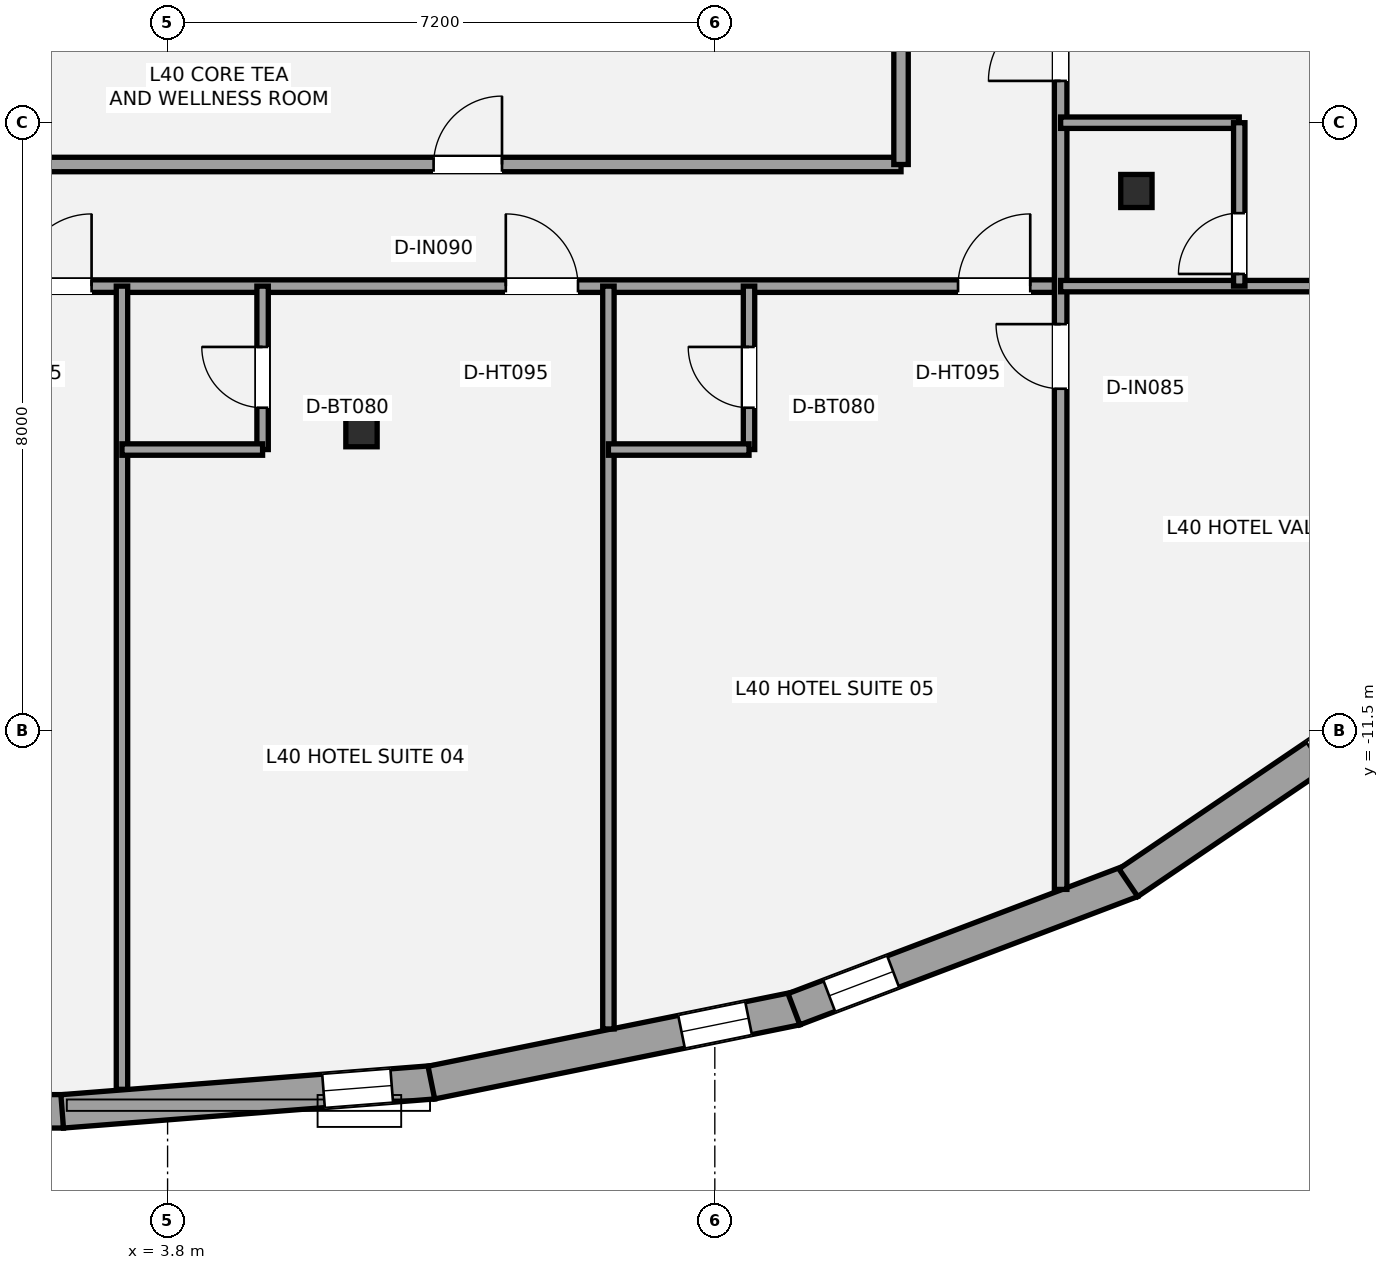
"""IFC4 building model, lengths in metres.
Left out: names, types, materials, properties, quantities, classifications, styles, units other than length and angle.
Written with IfcOpenShell. Run it as: python <this file> out.ifc"""

import sys

from ifc_helpers import new_model, si_unit, direction, frame, frame_2d, origin, origin_2d, place, context, subcontext, project, spatial, rectangle, i_section, extrude, element, fill, save


model = new_model("IFC4")
c1 = context("Model", 3, precision=1e-05, world=origin(), true_north=direction((0.0, 1.0)))
c2 = subcontext(c1, "Body", "Model", "MODEL_VIEW")
j1 = project(units=[si_unit("LENGTHUNIT", "METRE"), si_unit("PLANEANGLEUNIT", "RADIAN")], contexts=[c1])
p1 = place(None, origin())
s1 = spatial("IfcSite", under=j1, at=p1, CompositionType="ELEMENT")
p2 = place(p1, origin())
s2 = spatial("IfcBuilding", under=s1, at=p2, CompositionType="ELEMENT")
p3 = place(p2, frame((0.0, 0.0, 150.2)))
s3 = spatial("IfcBuildingStorey", under=s2, at=p3, CompositionType="ELEMENT", Elevation=150.2)
for number, where, z_axis, x_axis in (
    (1, (6.351, -7.546, 0.0), (0.0, 0.0, 1.0), (1.0, 0.0, 0.0)),
    (2, (16.547, -4.398, 0.0), (0.0, 0.0, 1.0), (1.0, 0.0, 0.0)),
):
    element("IfcColumn", number, at=place(p3, frame(where, z_axis=z_axis, x_axis=x_axis)), inside=s3, PredefinedType="COLUMN", context=c2, shape_type="SweptSolid", body=[
        extrude(i_section(OverallWidth=0.412, OverallDepth=0.435, WebThickness=0.036, FlangeThickness=0.057, at=origin_2d()), origin(), (0.0, 0.0, 1.0), 3.2),
    ])
p4 = place(p3, frame((2.43, -16.507, 0.0), z_axis=(0.0, 0.0, 1.0), x_axis=(-1.0, 0.0, 0.0)))
e3 = element("IfcWall", 3, at=p4, inside=s3, PredefinedType="STANDARD", context=c2, shape_type="SweptSolid", body=[
    extrude(rectangle(XDim=4.861, YDim=0.44, at=frame_2d((2.43, 0.0))), origin(), (0.0, 0.0, 1.0), 2.315),
])
p5 = place(p4, frame((0.596, 0.0, 0.58)))
e4 = element("IfcOpeningElement", 4, at=p5, cuts=e3, PredefinedType="OPENING", context=c2, shape_type="SweptSolid", body=[
    extrude(rectangle(XDim=0.9, YDim=1.35, at=frame_2d((0.45, 0.675))), frame((0.0, 0.23, 0.0), z_axis=(0.0, -1.0, 0.0), x_axis=(1.0, 0.0, 0.0)), (0.0, 0.0, 1.0), 0.46),
])
p6 = place(p3, frame((7.297, -16.125, 0.0), z_axis=(0.0, 0.0, 1.0), x_axis=(-0.996946218403, -0.078091213409, 0.0)))
e5 = element("IfcWall", 5, at=p6, inside=s3, PredefinedType="STANDARD", context=c2, shape_type="SweptSolid", body=[
    extrude(rectangle(XDim=4.899, YDim=0.44, at=frame_2d((2.449, 0.0))), origin(), (0.0, 0.0, 1.0), 2.315),
])
p7 = place(p6, frame((0.55, 0.0, 0.58)))
e6 = element("IfcOpeningElement", 6, at=p7, cuts=e5, PredefinedType="OPENING", context=c2, shape_type="SweptSolid", body=[
    extrude(rectangle(XDim=0.9, YDim=1.35, at=frame_2d((0.45, 0.675))), frame((0.0, 0.23, 0.0), z_axis=(0.0, -1.0, 0.0), x_axis=(1.0, 0.0, 0.0)), (0.0, 0.0, 1.0), 0.46),
])
p8 = place(p3, frame((12.075, -15.153, 0.0), z_axis=(0.0, 0.0, 1.0), x_axis=(-0.980021305588, -0.198892535291, 0.0)))
e7 = element("IfcWall", 7, at=p8, inside=s3, PredefinedType="STANDARD", context=c2, shape_type="SweptSolid", body=[
    extrude(rectangle(XDim=4.903, YDim=0.44, at=frame_2d((2.451, 0.0))), origin(), (0.0, 0.0, 1.0), 2.315),
])
p9 = place(p8, frame((0.644, 0.0, 0.58)))
e8 = element("IfcOpeningElement", 8, at=p9, cuts=e7, PredefinedType="OPENING", context=c2, shape_type="SweptSolid", body=[
    extrude(rectangle(XDim=0.9, YDim=1.35, at=frame_2d((0.45, 0.675))), frame((0.0, 0.23, 0.0), z_axis=(0.0, -1.0, 0.0), x_axis=(1.0, 0.0, 0.0)), (0.0, 0.0, 1.0), 0.46),
])
p10 = place(p3, frame((16.486, -13.475, 0.0), z_axis=(0.0, 0.0, 1.0), x_axis=(-0.93488004884, -0.354963792916, 0.0)))
e9 = element("IfcWall", 9, at=p10, inside=s3, PredefinedType="STANDARD", context=c2, shape_type="SweptSolid", body=[
    extrude(rectangle(XDim=4.755, YDim=0.44, at=frame_2d((2.377, 0.0))), origin(), (0.0, 0.0, 1.0), 2.315),
])
p11 = place(p10, frame((3.358, 0.0, 0.58)))
e10 = element("IfcOpeningElement", 10, at=p11, cuts=e9, PredefinedType="OPENING", context=c2, shape_type="SweptSolid", body=[
    extrude(rectangle(XDim=0.9, YDim=1.35, at=frame_2d((0.45, 0.675))), frame((0.0, 0.23, 0.0), z_axis=(0.0, -1.0, 0.0), x_axis=(1.0, 0.0, 0.0)), (0.0, 0.0, 1.0), 0.46),
])
p12 = place(p3, frame((20.06, -11.046, 0.0), z_axis=(0.0, 0.0, 1.0), x_axis=(-0.827782339513, -0.561049372507, 0.0)))
e11 = element("IfcWall", 11, at=p12, inside=s3, PredefinedType="STANDARD", context=c2, shape_type="SweptSolid", body=[
    extrude(rectangle(XDim=4.372, YDim=0.44, at=frame_2d((2.186, 0.0))), origin(), (0.0, 0.0, 1.0), 2.315),
])
p13 = place(p12, frame((0.497, 0.0, 0.58)))
e12 = element("IfcOpeningElement", 12, at=p13, cuts=e11, PredefinedType="OPENING", context=c2, shape_type="SweptSolid", body=[
    extrude(rectangle(XDim=0.9, YDim=1.35, at=frame_2d((0.45, 0.675))), frame((0.0, 0.23, 0.0), z_axis=(0.0, -1.0, 0.0), x_axis=(1.0, 0.0, 0.0)), (0.0, 0.0, 1.0), 0.46),
])
p14 = place(p3, frame((2.1, -4.05, 0.0), z_axis=(0.0, 0.0, 1.0), x_axis=(1.0, 0.0, 0.0)))
e13 = element("IfcWall", 13, at=p14, inside=s3, PredefinedType="PLUMBINGWALL", context=c2, shape_type="SweptSolid", body=[
    extrude(rectangle(XDim=11.35, YDim=0.19, at=frame_2d((5.675, 0.0))), origin(), (0.0, 0.0, 1.0), 2.473),
])
p15 = place(p14, frame((5.2, 0.0, 0.0)))
e14 = element("IfcOpeningElement", 14, at=p15, cuts=e13, PredefinedType="OPENING", context=c2, shape_type="SweptSolid", body=[
    extrude(rectangle(XDim=0.9, YDim=2.1, at=frame_2d((0.45, 1.05))), frame((0.0, 0.105, 0.0), z_axis=(0.0, -1.0, 0.0), x_axis=(1.0, 0.0, 0.0)), (0.0, 0.0, 1.0), 0.21),
])
p16 = place(p3, frame((13.45, -4.05, 0.0), z_axis=(0.0, 0.0, 1.0), x_axis=(0.0, 1.0, 0.0)))
e15 = element("IfcWall", 15, at=p16, inside=s3, PredefinedType="PLUMBINGWALL", context=c2, shape_type="SweptSolid", body=[
    extrude(rectangle(XDim=1.9, YDim=0.19, at=frame_2d((0.95, 0.0))), origin(), (0.0, 0.0, 1.0), 2.473),
])
p17 = place(p3, frame((-15.55, -5.65, 0.0), z_axis=(0.0, 0.0, 1.0), x_axis=(1.0, 0.0, 0.0)))
e16 = element("IfcWall", 16, at=p17, inside=s3, PredefinedType="PARTITIONING", context=c2, shape_type="SweptSolid", body=[
    extrude(rectangle(XDim=31.1, YDim=0.165, at=frame_2d((15.55, 0.0))), origin(), (0.0, 0.0, 1.0), 2.398),
])
p18 = place(p17, frame((4.6, 0.0, 0.0)))
e17 = element("IfcOpeningElement", 17, at=p18, cuts=e16, PredefinedType="OPENING", context=c2, shape_type="SweptSolid", body=[
    extrude(rectangle(XDim=0.95, YDim=2.15, at=frame_2d((0.475, 1.075))), frame((0.0, 0.093, 0.0), z_axis=(0.0, -1.0, 0.0), x_axis=(1.0, 0.0, 0.0)), (0.0, 0.0, 1.0), 0.185),
])
p19 = place(p17, frame((11.0, 0.0, 0.0)))
e18 = element("IfcOpeningElement", 18, at=p19, cuts=e16, PredefinedType="OPENING", context=c2, shape_type="SweptSolid", body=[
    extrude(rectangle(XDim=0.95, YDim=2.15, at=frame_2d((0.475, 1.075))), frame((0.0, 0.093, 0.0), z_axis=(0.0, -1.0, 0.0), x_axis=(1.0, 0.0, 0.0)), (0.0, 0.0, 1.0), 0.185),
])
p20 = place(p17, frame((17.4, 0.0, 0.0)))
e19 = element("IfcOpeningElement", 19, at=p20, cuts=e16, PredefinedType="OPENING", context=c2, shape_type="SweptSolid", body=[
    extrude(rectangle(XDim=0.95, YDim=2.15, at=frame_2d((0.475, 1.075))), frame((0.0, 0.093, 0.0), z_axis=(0.0, -1.0, 0.0), x_axis=(1.0, 0.0, 0.0)), (0.0, 0.0, 1.0), 0.185),
])
p21 = place(p17, frame((23.8, 0.0, 0.0)))
e20 = element("IfcOpeningElement", 20, at=p21, cuts=e16, PredefinedType="OPENING", context=c2, shape_type="SweptSolid", body=[
    extrude(rectangle(XDim=0.95, YDim=2.15, at=frame_2d((0.475, 1.075))), frame((0.0, 0.093, 0.0), z_axis=(0.0, -1.0, 0.0), x_axis=(1.0, 0.0, 0.0)), (0.0, 0.0, 1.0), 0.185),
])
p22 = place(p17, frame((29.75, 0.0, 0.0)))
e21 = element("IfcOpeningElement", 21, at=p22, cuts=e16, PredefinedType="OPENING", context=c2, shape_type="SweptSolid", body=[
    extrude(rectangle(XDim=0.95, YDim=2.15, at=frame_2d((0.475, 1.075))), frame((0.0, 0.093, 0.0), z_axis=(0.0, -1.0, 0.0), x_axis=(1.0, 0.0, 0.0)), (0.0, 0.0, 1.0), 0.185),
])
p23 = place(p3, frame((15.55, -13.587, 0.0), z_axis=(0.0, 0.0, 1.0), x_axis=(0.0, 1.0, 0.0)))
e22 = element("IfcWall", 22, at=p23, inside=s3, PredefinedType="PARTITIONING", context=c2, shape_type="SweptSolid", body=[
    extrude(rectangle(XDim=21.137, YDim=0.165, at=frame_2d((10.568, 0.0))), origin(), (0.0, 0.0, 1.0), 2.473),
])
p24 = place(p23, frame((6.587, 0.0, 0.0)))
e23 = element("IfcOpeningElement", 23, at=p24, cuts=e22, PredefinedType="OPENING", context=c2, shape_type="SweptSolid", body=[
    extrude(rectangle(XDim=0.85, YDim=2.1, at=frame_2d((0.425, 1.05))), frame((0.0, 0.093, 0.0), z_axis=(0.0, -1.0, 0.0), x_axis=(1.0, 0.0, 0.0)), (0.0, 0.0, 1.0), 0.185),
])
p25 = place(p23, frame((10.637, 0.0, 0.0)))
e24 = element("IfcOpeningElement", 24, at=p25, cuts=e22, PredefinedType="OPENING", context=c2, shape_type="SweptSolid", body=[
    extrude(rectangle(XDim=0.95, YDim=2.15, at=frame_2d((0.475, 1.075))), frame((0.0, 0.093, 0.0), z_axis=(0.0, -1.0, 0.0), x_axis=(1.0, 0.0, 0.0)), (0.0, 0.0, 1.0), 0.185),
])
p26 = place(p23, frame((15.037, 0.0, 0.0)))
e25 = element("IfcOpeningElement", 25, at=p26, cuts=e22, PredefinedType="OPENING", context=c2, shape_type="SweptSolid", body=[
    extrude(rectangle(XDim=0.95, YDim=2.15, at=frame_2d((0.475, 1.075))), frame((0.0, 0.093, 0.0), z_axis=(0.0, -1.0, 0.0), x_axis=(1.0, 0.0, 0.0)), (0.0, 0.0, 1.0), 0.185),
])
p27 = place(p23, frame((19.787, 0.0, 0.0)))
e26 = element("IfcOpeningElement", 26, at=p27, cuts=e22, PredefinedType="OPENING", context=c2, shape_type="SweptSolid", body=[
    extrude(rectangle(XDim=0.95, YDim=2.15, at=frame_2d((0.475, 1.075))), frame((0.0, 0.093, 0.0), z_axis=(0.0, -1.0, 0.0), x_axis=(1.0, 0.0, 0.0)), (0.0, 0.0, 1.0), 0.185),
])
p28 = place(p3, frame((15.55, -5.65, 0.0), z_axis=(0.0, 0.0, 1.0), x_axis=(1.0, 0.0, 0.0)))
e27 = element("IfcWall", 27, at=p28, inside=s3, PredefinedType="PLUMBINGWALL", context=c2, shape_type="SweptSolid", body=[
    extrude(rectangle(XDim=7.766, YDim=0.15, at=frame_2d((3.883, 0.0))), origin(), (0.0, 0.0, 1.0), 2.473),
])
p29 = place(p3, frame((3.2, -16.217, 0.0), z_axis=(0.0, 0.0, 1.0), x_axis=(0.0, 1.0, 0.0)))
e28 = element("IfcWall", 28, at=p29, inside=s3, PredefinedType="PLUMBINGWALL", context=c2, shape_type="SweptSolid", body=[
    extrude(rectangle(XDim=10.567, YDim=0.15, at=frame_2d((5.283, 0.0))), origin(), (0.0, 0.0, 1.0), 2.473),
])
p30 = place(p3, frame((9.6, -15.423, 0.0), z_axis=(0.0, 0.0, 1.0), x_axis=(0.0, 1.0, 0.0)))
e29 = element("IfcWall", 29, at=p30, inside=s3, PredefinedType="PLUMBINGWALL", context=c2, shape_type="SweptSolid", body=[
    extrude(rectangle(XDim=9.773, YDim=0.15, at=frame_2d((4.886, 0.0))), origin(), (0.0, 0.0, 1.0), 2.473),
])
p31 = place(p3, frame((5.05, -7.8, 0.0), z_axis=(0.0, 0.0, 1.0), x_axis=(0.0, 1.0, 0.0)))
e30 = element("IfcWall", 30, at=p31, inside=s3, PredefinedType="PLUMBINGWALL", context=c2, shape_type="SweptSolid", body=[
    extrude(rectangle(XDim=2.15, YDim=0.15, at=frame_2d((1.075, 0.0))), origin(), (0.0, 0.0, 1.0), 2.473),
])
p32 = place(p31, frame((0.55, 0.0, 0.0)))
e31 = element("IfcOpeningElement", 31, at=p32, cuts=e30, PredefinedType="OPENING", context=c2, shape_type="SweptSolid", body=[
    extrude(rectangle(XDim=0.8, YDim=2.1, at=frame_2d((0.4, 1.05))), frame((0.0, 0.085, 0.0), z_axis=(0.0, -1.0, 0.0), x_axis=(1.0, 0.0, 0.0)), (0.0, 0.0, 1.0), 0.17),
])
p33 = place(p3, frame((3.2, -7.8, 0.0), z_axis=(0.0, 0.0, 1.0), x_axis=(1.0, 0.0, 0.0)))
e32 = element("IfcWall", 32, at=p33, inside=s3, PredefinedType="PLUMBINGWALL", context=c2, shape_type="SweptSolid", body=[
    extrude(rectangle(XDim=1.85, YDim=0.15, at=frame_2d((0.925, 0.0))), origin(), (0.0, 0.0, 1.0), 3.02),
])
p34 = place(p3, frame((11.45, -7.8, 0.0), z_axis=(0.0, 0.0, 1.0), x_axis=(0.0, 1.0, 0.0)))
e33 = element("IfcWall", 33, at=p34, inside=s3, PredefinedType="PLUMBINGWALL", context=c2, shape_type="SweptSolid", body=[
    extrude(rectangle(XDim=2.15, YDim=0.15, at=frame_2d((1.075, 0.0))), origin(), (0.0, 0.0, 1.0), 2.473),
])
p35 = place(p34, frame((0.55, 0.0, 0.0)))
e34 = element("IfcOpeningElement", 34, at=p35, cuts=e33, PredefinedType="OPENING", context=c2, shape_type="SweptSolid", body=[
    extrude(rectangle(XDim=0.8, YDim=2.1, at=frame_2d((0.4, 1.05))), frame((0.0, 0.085, 0.0), z_axis=(0.0, -1.0, 0.0), x_axis=(1.0, 0.0, 0.0)), (0.0, 0.0, 1.0), 0.17),
])
p36 = place(p3, frame((9.6, -7.8, 0.0), z_axis=(0.0, 0.0, 1.0), x_axis=(1.0, 0.0, 0.0)))
e35 = element("IfcWall", 35, at=p36, inside=s3, PredefinedType="PLUMBINGWALL", context=c2, shape_type="SweptSolid", body=[
    extrude(rectangle(XDim=1.85, YDim=0.15, at=frame_2d((0.925, 0.0))), origin(), (0.0, 0.0, 1.0), 3.02),
])
p37 = place(p3, frame((15.55, -3.5, 0.0), z_axis=(0.0, 0.0, 1.0), x_axis=(1.0, 0.0, 0.0)))
e36 = element("IfcWall", 36, at=p37, inside=s3, PredefinedType="PLUMBINGWALL", context=c2, shape_type="SweptSolid", body=[
    extrude(rectangle(XDim=2.35, YDim=0.15, at=frame_2d((1.175, 0.0))), origin(), (0.0, 0.0, 1.0), 2.398),
])
p38 = place(p3, frame((17.9, -5.65, 0.0), z_axis=(0.0, 0.0, 1.0), x_axis=(0.0, 1.0, 0.0)))
e37 = element("IfcWall", 37, at=p38, inside=s3, PredefinedType="PLUMBINGWALL", context=c2, shape_type="SweptSolid", body=[
    extrude(rectangle(XDim=2.15, YDim=0.15, at=frame_2d((1.075, 0.0))), origin(), (0.0, 0.0, 1.0), 2.473),
])
p39 = place(p38, frame((0.16, 0.0, 0.0)))
e38 = element("IfcOpeningElement", 38, at=p39, cuts=e37, PredefinedType="OPENING", context=c2, shape_type="SweptSolid", body=[
    extrude(rectangle(XDim=0.8, YDim=2.1, at=frame_2d((0.4, 1.05))), frame((0.0, 0.085, 0.0), z_axis=(0.0, -1.0, 0.0), x_axis=(1.0, 0.0, 0.0)), (0.0, 0.0, 1.0), 0.17),
])
p40 = place(p7, origin())
e39 = element("IfcWindow", 39, at=p40, inside=s3, PartitioningType="SINGLE_PANEL", PredefinedType="WINDOW", context=c2, shape_type="SweptSolid", body=[
    extrude(rectangle(XDim=0.9, YDim=1.35, at=frame_2d((0.45, 0.675))), frame((0.0, -0.01, 0.0), z_axis=(0.0, -1.0, 0.0), x_axis=(1.0, 0.0, 0.0)), (0.0, 0.0, 1.0), 0.06),
])
fill(e6, e39)
p41 = place(p9, origin())
e40 = element("IfcWindow", 40, at=p41, inside=s3, PartitioningType="SINGLE_PANEL", PredefinedType="WINDOW", context=c2, shape_type="SweptSolid", body=[
    extrude(rectangle(XDim=0.9, YDim=1.35, at=frame_2d((0.45, 0.675))), frame((0.0, -0.01, 0.0), z_axis=(0.0, -1.0, 0.0), x_axis=(1.0, 0.0, 0.0)), (0.0, 0.0, 1.0), 0.06),
])
fill(e8, e40)
p42 = place(p11, origin())
e41 = element("IfcWindow", 41, at=p42, inside=s3, PartitioningType="SINGLE_PANEL", PredefinedType="WINDOW", context=c2, shape_type="SweptSolid", body=[
    extrude(rectangle(XDim=0.9, YDim=1.35, at=frame_2d((0.45, 0.675))), frame((0.0, -0.01, 0.0), z_axis=(0.0, -1.0, 0.0), x_axis=(1.0, 0.0, 0.0)), (0.0, 0.0, 1.0), 0.06),
])
fill(e10, e41)
p43 = place(p15, origin())
e42 = element("IfcDoor", 42, at=p43, inside=s3, OperationType="SINGLE_SWING_RIGHT", PredefinedType="DOOR", context=c2, shape_type="SweptSolid", body=[
    extrude(rectangle(XDim=0.9, YDim=2.1, at=frame_2d((0.45, 1.05))), frame((0.0, 0.025, 0.0), z_axis=(0.0, -1.0, 0.0), x_axis=(1.0, 0.0, 0.0)), (0.0, 0.0, 1.0), 0.05),
])
fill(e14, e42)
p44 = place(p24, origin())
e43 = element("IfcDoor", 43, at=p44, inside=s3, OperationType="SINGLE_SWING_RIGHT", PredefinedType="DOOR", context=c2, shape_type="SweptSolid", body=[
    extrude(rectangle(XDim=0.85, YDim=2.1, at=frame_2d((0.425, 1.05))), frame((0.0, 0.025, 0.0), z_axis=(0.0, -1.0, 0.0), x_axis=(1.0, 0.0, 0.0)), (0.0, 0.0, 1.0), 0.05),
])
fill(e23, e43)
p45 = place(p20, origin())
e44 = element("IfcDoor", 44, at=p45, inside=s3, OperationType="SINGLE_SWING_RIGHT", PredefinedType="DOOR", context=c2, shape_type="SweptSolid", body=[
    extrude(rectangle(XDim=0.95, YDim=2.15, at=frame_2d((0.475, 1.075))), frame((0.0, 0.025, 0.0), z_axis=(0.0, -1.0, 0.0), x_axis=(1.0, 0.0, 0.0)), (0.0, 0.0, 1.0), 0.05),
])
fill(e19, e44)
p46 = place(p21, origin())
e45 = element("IfcDoor", 45, at=p46, inside=s3, OperationType="SINGLE_SWING_LEFT", PredefinedType="DOOR", context=c2, shape_type="SweptSolid", body=[
    extrude(rectangle(XDim=0.95, YDim=2.15, at=frame_2d((0.475, 1.075))), frame((0.0, 0.025, 0.0), z_axis=(0.0, -1.0, 0.0), x_axis=(1.0, 0.0, 0.0)), (0.0, 0.0, 1.0), 0.05),
])
fill(e20, e45)
p47 = place(p32, origin())
e46 = element("IfcDoor", 46, at=p47, inside=s3, OperationType="SINGLE_SWING_RIGHT", PredefinedType="DOOR", context=c2, shape_type="SweptSolid", body=[
    extrude(rectangle(XDim=0.8, YDim=2.1, at=frame_2d((0.4, 1.05))), frame((0.0, 0.025, 0.0), z_axis=(0.0, -1.0, 0.0), x_axis=(1.0, 0.0, 0.0)), (0.0, 0.0, 1.0), 0.05),
])
fill(e31, e46)
p48 = place(p22, origin())
e47 = element("IfcDoor", 47, at=p48, inside=s3, OperationType="SINGLE_SWING_RIGHT", PredefinedType="DOOR", context=c2, shape_type="SweptSolid", body=[
    extrude(rectangle(XDim=0.95, YDim=2.15, at=frame_2d((0.475, 1.075))), frame((0.0, 0.025, 0.0), z_axis=(0.0, -1.0, 0.0), x_axis=(1.0, 0.0, 0.0)), (0.0, 0.0, 1.0), 0.05),
])
fill(e21, e47)
p49 = place(p35, origin())
e48 = element("IfcDoor", 48, at=p49, inside=s3, OperationType="SINGLE_SWING_RIGHT", PredefinedType="DOOR", context=c2, shape_type="SweptSolid", body=[
    extrude(rectangle(XDim=0.8, YDim=2.1, at=frame_2d((0.4, 1.05))), frame((0.0, 0.025, 0.0), z_axis=(0.0, -1.0, 0.0), x_axis=(1.0, 0.0, 0.0)), (0.0, 0.0, 1.0), 0.05),
])
fill(e34, e48)
p50 = place(p25, origin())
e49 = element("IfcDoor", 49, at=p50, inside=s3, OperationType="SINGLE_SWING_LEFT", PredefinedType="DOOR", context=c2, shape_type="SweptSolid", body=[
    extrude(rectangle(XDim=0.95, YDim=2.15, at=frame_2d((0.475, 1.075))), frame((0.0, 0.025, 0.0), z_axis=(0.0, -1.0, 0.0), x_axis=(1.0, 0.0, 0.0)), (0.0, 0.0, 1.0), 0.05),
])
fill(e24, e49)
p51 = place(p39, origin())
e50 = element("IfcDoor", 50, at=p51, inside=s3, OperationType="SINGLE_SWING_LEFT", PredefinedType="DOOR", context=c2, shape_type="SweptSolid", body=[
    extrude(rectangle(XDim=0.8, YDim=2.1, at=frame_2d((0.4, 1.05))), frame((0.0, 0.025, 0.0), z_axis=(0.0, -1.0, 0.0), x_axis=(1.0, 0.0, 0.0)), (0.0, 0.0, 1.0), 0.05),
])
fill(e38, e50)
save(model, sys.argv[1])
